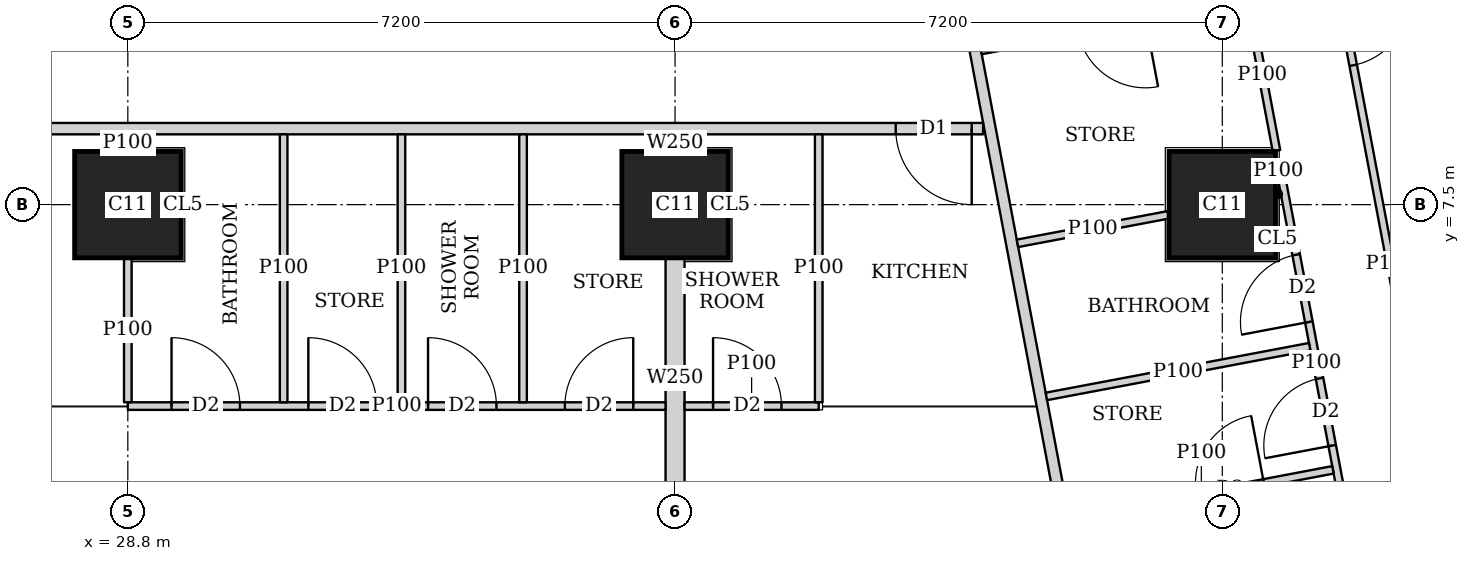
"""IFC4 building model, lengths in metres.
Left out: names, types, materials, properties, quantities, classifications, styles, units other than length and angle.
Written with IfcOpenShell. Run it as: python <this file> out.ifc"""

import sys

from ifc_helpers import new_model, si_unit, direction, frame, frame_2d, origin, origin_2d, place, context, subcontext, project, spatial, rectangle, extrude, element, fill, save


model = new_model("IFC4")
c1 = context("Model", 3, precision=1e-05, world=origin(), true_north=direction((0.0, 1.0)))
c2 = subcontext(c1, "Body", "Model", "MODEL_VIEW")
j1 = project(units=[si_unit("LENGTHUNIT", "METRE"), si_unit("PLANEANGLEUNIT", "RADIAN")], contexts=[c1])
p1 = place(None, origin())
s1 = spatial("IfcSite", under=j1, at=p1, CompositionType="ELEMENT")
p2 = place(p1, origin())
s2 = spatial("IfcBuilding", under=s1, at=p2, CompositionType="ELEMENT")
p3 = place(p2, frame((0.0, 0.0, 212.45)))
s3 = spatial("IfcBuildingStorey", under=s2, at=p3, CompositionType="ELEMENT", Elevation=212.45)
for number, where, z_axis, x_axis in (
    (1, (28.8, 7.5, 0.0), (0.0, 0.0, 1.0), (1.0, 0.0, 0.0)),
    (2, (36.0, 7.5, 0.0), (0.0, 0.0, 1.0), (1.0, 0.0, 0.0)),
    (3, (43.2, 7.5, 0.0), (0.0, 0.0, 1.0), (1.0, 0.0, 0.0)),
):
    element("IfcColumn", number, at=place(p3, frame(where, z_axis=z_axis, x_axis=x_axis)), inside=s3, PredefinedType="COLUMN", context=c2, shape_type="SweptSolid", body=[
        extrude(rectangle(XDim=1.4, YDim=1.4, at=origin_2d()), origin(), (0.0, 0.0, 1.0), 3.75),
    ])
p4 = place(p3, frame((50.653, 2.703, 0.0), z_axis=(0.0, 0.0, 1.0), x_axis=(-0.185612026696, 0.982623109613, 0.0)))
e4 = element("IfcWall", 4, at=p4, inside=s3, PredefinedType="SOLIDWALL", context=c2, shape_type="SweptSolid", body=[
    extrude(rectangle(XDim=41.393, YDim=0.2, at=frame_2d((20.697, 0.0))), origin(), (0.0, 0.0, 1.0), 3.5),
])
p5 = place(p4, frame((1.633, 0.0, 0.9)))
e5 = element("IfcOpeningElement", 5, at=p5, cuts=e4, PredefinedType="OPENING", context=c2, shape_type="SweptSolid", body=[
    extrude(rectangle(XDim=1.8, YDim=1.5, at=frame_2d((0.9, 0.75))), frame((0.0, 0.11, 0.0), z_axis=(0.0, -1.0, 0.0), x_axis=(1.0, 0.0, 0.0)), (0.0, 0.0, 1.0), 0.22),
])
p6 = place(p4, frame((6.032, 0.0, 0.9)))
e6 = element("IfcOpeningElement", 6, at=p6, cuts=e4, PredefinedType="OPENING", context=c2, shape_type="SweptSolid", body=[
    extrude(rectangle(XDim=1.8, YDim=1.5, at=frame_2d((0.9, 0.75))), frame((0.0, 0.11, 0.0), z_axis=(0.0, -1.0, 0.0), x_axis=(1.0, 0.0, 0.0)), (0.0, 0.0, 1.0), 0.22),
])
p7 = place(p4, frame((9.848, 0.0, 0.9)))
e7 = element("IfcOpeningElement", 7, at=p7, cuts=e4, PredefinedType="OPENING", context=c2, shape_type="SweptSolid", body=[
    extrude(rectangle(XDim=1.8, YDim=1.5, at=frame_2d((0.9, 0.75))), frame((0.0, 0.11, 0.0), z_axis=(0.0, -1.0, 0.0), x_axis=(1.0, 0.0, 0.0)), (0.0, 0.0, 1.0), 0.22),
])
p8 = place(p4, frame((13.664, 0.0, 0.9)))
e8 = element("IfcOpeningElement", 8, at=p8, cuts=e4, PredefinedType="OPENING", context=c2, shape_type="SweptSolid", body=[
    extrude(rectangle(XDim=1.8, YDim=1.5, at=frame_2d((0.9, 0.75))), frame((0.0, 0.11, 0.0), z_axis=(0.0, -1.0, 0.0), x_axis=(1.0, 0.0, 0.0)), (0.0, 0.0, 1.0), 0.22),
])
p9 = place(p4, frame((17.481, 0.0, 0.9)))
e9 = element("IfcOpeningElement", 9, at=p9, cuts=e4, PredefinedType="OPENING", context=c2, shape_type="SweptSolid", body=[
    extrude(rectangle(XDim=1.8, YDim=1.5, at=frame_2d((0.9, 0.75))), frame((0.0, 0.11, 0.0), z_axis=(0.0, -1.0, 0.0), x_axis=(1.0, 0.0, 0.0)), (0.0, 0.0, 1.0), 0.22),
])
p10 = place(p4, frame((21.297, 0.0, 0.9)))
e10 = element("IfcOpeningElement", 10, at=p10, cuts=e4, PredefinedType="OPENING", context=c2, shape_type="SweptSolid", body=[
    extrude(rectangle(XDim=1.8, YDim=1.5, at=frame_2d((0.9, 0.75))), frame((0.0, 0.11, 0.0), z_axis=(0.0, -1.0, 0.0), x_axis=(1.0, 0.0, 0.0)), (0.0, 0.0, 1.0), 0.22),
])
p11 = place(p4, frame((25.113, 0.0, 0.9)))
e11 = element("IfcOpeningElement", 11, at=p11, cuts=e4, PredefinedType="OPENING", context=c2, shape_type="SweptSolid", body=[
    extrude(rectangle(XDim=1.8, YDim=1.5, at=frame_2d((0.9, 0.75))), frame((0.0, 0.11, 0.0), z_axis=(0.0, -1.0, 0.0), x_axis=(1.0, 0.0, 0.0)), (0.0, 0.0, 1.0), 0.22),
])
p12 = place(p4, frame((28.93, 0.0, 0.9)))
e12 = element("IfcOpeningElement", 12, at=p12, cuts=e4, PredefinedType="OPENING", context=c2, shape_type="SweptSolid", body=[
    extrude(rectangle(XDim=1.8, YDim=1.5, at=frame_2d((0.9, 0.75))), frame((0.0, 0.11, 0.0), z_axis=(0.0, -1.0, 0.0), x_axis=(1.0, 0.0, 0.0)), (0.0, 0.0, 1.0), 0.22),
])
p13 = place(p4, frame((32.746, 0.0, 0.9)))
e13 = element("IfcOpeningElement", 13, at=p13, cuts=e4, PredefinedType="OPENING", context=c2, shape_type="SweptSolid", body=[
    extrude(rectangle(XDim=1.8, YDim=1.5, at=frame_2d((0.9, 0.75))), frame((0.0, 0.11, 0.0), z_axis=(0.0, -1.0, 0.0), x_axis=(1.0, 0.0, 0.0)), (0.0, 0.0, 1.0), 0.22),
])
p14 = place(p4, frame((36.481, 0.0, 0.9)))
e14 = element("IfcOpeningElement", 14, at=p14, cuts=e4, PredefinedType="OPENING", context=c2, shape_type="SweptSolid", body=[
    extrude(rectangle(XDim=1.8, YDim=1.5, at=frame_2d((0.9, 0.75))), frame((0.0, 0.11, 0.0), z_axis=(0.0, -1.0, 0.0), x_axis=(1.0, 0.0, 0.0)), (0.0, 0.0, 1.0), 0.22),
])
p15 = place(p3, frame((40.053, 8.5, 0.0), z_axis=(0.0, 0.0, 1.0), x_axis=(-1.0, 0.0, 0.0)))
e15 = element("IfcWall", 15, at=p15, inside=s3, PredefinedType="SOLIDWALL", context=c2, shape_type="SweptSolid", body=[
    extrude(rectangle(XDim=31.052, YDim=0.15, at=frame_2d((15.526, 0.0))), origin(), (0.0, 0.0, 1.0), 3.5),
])
p16 = place(p15, frame((29.178, 0.0, 0.0)))
e16 = element("IfcOpeningElement", 16, at=p16, cuts=e15, PredefinedType="OPENING", context=c2, shape_type="SweptSolid", body=[
    extrude(rectangle(XDim=1.0, YDim=2.1, at=frame_2d((0.5, 1.05))), frame((0.0, 0.085, 0.0), z_axis=(0.0, -1.0, 0.0), x_axis=(1.0, 0.0, 0.0)), (0.0, 0.0, 1.0), 0.17),
])
p17 = place(p15, frame((19.953, 0.0, 0.0)))
e17 = element("IfcOpeningElement", 17, at=p17, cuts=e15, PredefinedType="OPENING", context=c2, shape_type="SweptSolid", body=[
    extrude(rectangle(XDim=1.0, YDim=2.1, at=frame_2d((0.5, 1.05))), frame((0.0, 0.085, 0.0), z_axis=(0.0, -1.0, 0.0), x_axis=(1.0, 0.0, 0.0)), (0.0, 0.0, 1.0), 0.17),
])
p18 = place(p15, frame((12.753, 0.0, 0.0)))
e18 = element("IfcOpeningElement", 18, at=p18, cuts=e15, PredefinedType="OPENING", context=c2, shape_type="SweptSolid", body=[
    extrude(rectangle(XDim=1.0, YDim=2.1, at=frame_2d((0.5, 1.05))), frame((0.0, 0.085, 0.0), z_axis=(0.0, -1.0, 0.0), x_axis=(1.0, 0.0, 0.0)), (0.0, 0.0, 1.0), 0.17),
])
p19 = place(p15, frame((0.15, 0.0, 0.0)))
e19 = element("IfcOpeningElement", 19, at=p19, cuts=e15, PredefinedType="OPENING", context=c2, shape_type="SweptSolid", body=[
    extrude(rectangle(XDim=1.0, YDim=2.1, at=frame_2d((0.5, 1.05))), frame((0.0, 0.085, 0.0), z_axis=(0.0, -1.0, 0.0), x_axis=(1.0, 0.0, 0.0)), (0.0, 0.0, 1.0), 0.17),
])
p20 = place(p3, frame((33.68, 42.723, 0.0), z_axis=(0.0, 0.0, 1.0), x_axis=(0.185601160014, -0.982625162207, 0.0)))
e20 = element("IfcWall", 20, at=p20, inside=s3, PredefinedType="SOLIDWALL", context=c2, shape_type="SweptSolid", body=[
    extrude(rectangle(XDim=41.051, YDim=0.15, at=frame_2d((20.526, 0.0))), origin(), (0.0, 0.0, 1.0), 2.5),
])
p21 = place(p20, frame((12.307, 0.0, 0.0)))
e21 = element("IfcOpeningElement", 21, at=p21, cuts=e20, PredefinedType="OPENING", context=c2, shape_type="SweptSolid", body=[
    extrude(rectangle(XDim=1.0, YDim=2.1, at=frame_2d((0.5, 1.05))), frame((0.0, 0.085, 0.0), z_axis=(0.0, -1.0, 0.0), x_axis=(1.0, 0.0, 0.0)), (0.0, 0.0, 1.0), 0.17),
])
p22 = place(p20, frame((16.123, 0.0, 0.0)))
e22 = element("IfcOpeningElement", 22, at=p22, cuts=e20, PredefinedType="OPENING", context=c2, shape_type="SweptSolid", body=[
    extrude(rectangle(XDim=1.0, YDim=2.1, at=frame_2d((0.5, 1.05))), frame((0.0, 0.085, 0.0), z_axis=(0.0, -1.0, 0.0), x_axis=(1.0, 0.0, 0.0)), (0.0, 0.0, 1.0), 0.17),
])
p23 = place(p20, frame((30.902, 0.0, 0.0)))
e23 = element("IfcOpeningElement", 23, at=p23, cuts=e20, PredefinedType="OPENING", context=c2, shape_type="SweptSolid", body=[
    extrude(rectangle(XDim=1.0, YDim=2.1, at=frame_2d((0.5, 1.05))), frame((0.0, 0.085, 0.0), z_axis=(0.0, -1.0, 0.0), x_axis=(1.0, 0.0, 0.0)), (0.0, 0.0, 1.0), 0.17),
])
p24 = place(p3, frame((35.875, 4.85, 0.0), z_axis=(0.0, 0.0, 1.0), x_axis=(-1.0, 0.0, 0.0)))
e24 = element("IfcWall", 24, at=p24, inside=s3, PredefinedType="PARTITIONING", context=c2, shape_type="SweptSolid", body=[
    extrude(rectangle(XDim=7.075, YDim=0.1, at=frame_2d((3.538, 0.0))), origin(), (0.0, 0.0, 1.0), 3.5),
])
p25 = place(p24, frame((5.6, 0.0, 0.0)))
e25 = element("IfcOpeningElement", 25, at=p25, cuts=e24, PredefinedType="OPENING", context=c2, shape_type="SweptSolid", body=[
    extrude(rectangle(XDim=0.9, YDim=2.1, at=frame_2d((0.45, 1.05))), frame((0.0, 0.06, 0.0), z_axis=(0.0, -1.0, 0.0), x_axis=(1.0, 0.0, 0.0)), (0.0, 0.0, 1.0), 0.12),
])
p26 = place(p24, frame((2.225, 0.0, 0.0)))
e26 = element("IfcOpeningElement", 26, at=p26, cuts=e24, PredefinedType="OPENING", context=c2, shape_type="SweptSolid", body=[
    extrude(rectangle(XDim=0.9, YDim=2.1, at=frame_2d((0.45, 1.05))), frame((0.0, 0.06, 0.0), z_axis=(0.0, -1.0, 0.0), x_axis=(1.0, 0.0, 0.0)), (0.0, 0.0, 1.0), 0.12),
])
p27 = place(p24, frame((3.8, 0.0, 0.0)))
e27 = element("IfcOpeningElement", 27, at=p27, cuts=e24, PredefinedType="OPENING", context=c2, shape_type="SweptSolid", body=[
    extrude(rectangle(XDim=0.9, YDim=2.1, at=frame_2d((0.45, 1.05))), frame((0.0, 0.06, 0.0), z_axis=(0.0, -1.0, 0.0), x_axis=(1.0, 0.0, 0.0)), (0.0, 0.0, 1.0), 0.12),
])
p28 = place(p24, frame((0.425, 0.0, 0.0)))
e28 = element("IfcOpeningElement", 28, at=p28, cuts=e24, PredefinedType="OPENING", context=c2, shape_type="SweptSolid", body=[
    extrude(rectangle(XDim=0.9, YDim=2.1, at=frame_2d((0.45, 1.05))), frame((0.0, 0.06, 0.0), z_axis=(0.0, -1.0, 0.0), x_axis=(1.0, 0.0, 0.0)), (0.0, 0.0, 1.0), 0.12),
])
p29 = place(p3, frame((28.8, 4.9, 0.0), z_axis=(0.0, 0.0, 1.0), x_axis=(0.0, 1.0, 0.0)))
e29 = element("IfcWall", 29, at=p29, inside=s3, PredefinedType="PARTITIONING", context=c2, shape_type="SweptSolid", body=[
    extrude(rectangle(XDim=1.899, YDim=0.1, at=frame_2d((0.95, 0.0))), origin(), (0.0, 0.0, 1.0), 3.5),
])
p30 = place(p3, frame((28.8, 8.201, 0.0), z_axis=(0.0, 0.0, 1.0), x_axis=(0.0, 1.0, 0.0)))
e30 = element("IfcWall", 30, at=p30, inside=s3, PredefinedType="PARTITIONING", context=c2, shape_type="SweptSolid", body=[
    extrude(rectangle(XDim=0.224, YDim=0.1, at=frame_2d((0.112, 0.0))), origin(), (0.0, 0.0, 1.0), 3.5),
])
for number, where, z_axis, x_axis in (
    (31, (32.4, 4.9, 0.0), (0.0, 0.0, 1.0), (0.0, 1.0, 0.0)),
    (32, (30.85, 4.9, 0.0), (0.0, 0.0, 1.0), (0.0, 1.0, 0.0)),
    (33, (34.0, 4.9, 0.0), (0.0, 0.0, 1.0), (0.0, 1.0, 0.0)),
):
    element("IfcWall", number, at=place(p3, frame(where, z_axis=z_axis, x_axis=x_axis)), inside=s3, PredefinedType="PARTITIONING", context=c2, shape_type="SweptSolid", body=[
        extrude(rectangle(XDim=3.525, YDim=0.1, at=frame_2d((1.763, 0.0))), origin(), (0.0, 0.0, 1.0), 3.5),
    ])
p31 = place(p3, frame((37.89, 4.85, 0.0), z_axis=(0.0, 0.0, 1.0), x_axis=(-1.0, 0.0, 0.0)))
e34 = element("IfcWall", 34, at=p31, inside=s3, PredefinedType="PARTITIONING", context=c2, shape_type="SweptSolid", body=[
    extrude(rectangle(XDim=1.765, YDim=0.1, at=frame_2d((0.882, 0.0))), origin(), (0.0, 0.0, 1.0), 3.5),
])
p32 = place(p31, frame((0.49, 0.0, 0.0)))
e35 = element("IfcOpeningElement", 35, at=p32, cuts=e34, PredefinedType="OPENING", context=c2, shape_type="SweptSolid", body=[
    extrude(rectangle(XDim=0.9, YDim=2.1, at=frame_2d((0.45, 1.05))), frame((0.0, 0.06, 0.0), z_axis=(0.0, -1.0, 0.0), x_axis=(1.0, 0.0, 0.0)), (0.0, 0.0, 1.0), 0.12),
])
p33 = place(p3, frame((37.89, 4.9, 0.0), z_axis=(0.0, 0.0, 1.0), x_axis=(0.0, 1.0, 0.0)))
e36 = element("IfcWall", 36, at=p33, inside=s3, PredefinedType="PARTITIONING", context=c2, shape_type="SweptSolid", body=[
    extrude(rectangle(XDim=3.525, YDim=0.1, at=frame_2d((1.763, 0.0))), origin(), (0.0, 0.0, 1.0), 3.5),
])
p34 = place(p3, frame((36.0, 3.65, 0.0), z_axis=(0.0, 0.0, 1.0), x_axis=(0.0, 1.0, 0.0)))
e37 = element("IfcWall", 37, at=p34, inside=s3, PredefinedType="SOLIDWALL", context=c2, shape_type="SweptSolid", body=[
    extrude(rectangle(XDim=3.149, YDim=0.25, at=frame_2d((1.575, 0.0))), origin(), (0.0, 0.0, 1.0), 3.5),
])
p35 = place(p3, frame((36.0, 8.201, 0.0), z_axis=(0.0, 0.0, 1.0), x_axis=(0.0, 1.0, 0.0)))
e38 = element("IfcWall", 38, at=p35, inside=s3, PredefinedType="SOLIDWALL", context=c2, shape_type="SweptSolid", body=[
    extrude(rectangle(XDim=0.224, YDim=0.25, at=frame_2d((0.112, 0.0))), origin(), (0.0, 0.0, 1.0), 3.5),
])
p36 = place(p3, frame((44.727, 10.366, 0.0), z_axis=(0.0, 0.0, 1.0), x_axis=(0.185678775129, -0.982610498858, 0.0)))
e39 = element("IfcWall", 39, at=p36, inside=s3, PredefinedType="PARTITIONING", context=c2, shape_type="SweptSolid", body=[
    extrude(rectangle(XDim=7.421, YDim=0.1, at=frame_2d((3.71, 0.0))), origin(), (0.0, 0.0, 1.0), 3.5),
])
p37 = place(p36, frame((0.151, 0.0, 0.0)))
e40 = element("IfcOpeningElement", 40, at=p37, cuts=e39, PredefinedType="OPENING", context=c2, shape_type="SweptSolid", body=[
    extrude(rectangle(XDim=0.9, YDim=2.1, at=frame_2d((0.45, 1.05))), frame((0.0, 0.06, 0.0), z_axis=(0.0, -1.0, 0.0), x_axis=(1.0, 0.0, 0.0)), (0.0, 0.0, 1.0), 0.12),
])
p38 = place(p36, frame((4.65, 0.0, 0.0)))
e41 = element("IfcOpeningElement", 41, at=p38, cuts=e39, PredefinedType="OPENING", context=c2, shape_type="SweptSolid", body=[
    extrude(rectangle(XDim=0.9, YDim=2.1, at=frame_2d((0.45, 1.05))), frame((0.0, 0.06, 0.0), z_axis=(0.0, -1.0, 0.0), x_axis=(1.0, 0.0, 0.0)), (0.0, 0.0, 1.0), 0.12),
])
p39 = place(p3, frame((43.539, 10.192, 0.0), z_axis=(0.0, 0.0, 1.0), x_axis=(0.185443145218, -0.982654995353, 0.0)))
e42 = element("IfcWall", 42, at=p39, inside=s3, PredefinedType="PARTITIONING", context=c2, shape_type="SweptSolid", body=[
    extrude(rectangle(XDim=2.017, YDim=0.1, at=frame_2d((1.008, 0.0))), origin(), (0.0, 0.0, 1.0), 3.5),
])
p40 = place(p3, frame((43.949, 8.02, 0.0), z_axis=(0.0, 0.0, 1.0), x_axis=(0.185656792073, -0.982614652627, 0.0)))
e43 = element("IfcWall", 43, at=p40, inside=s3, PredefinedType="PARTITIONING", context=c2, shape_type="SweptSolid", body=[
    extrude(rectangle(XDim=5.289, YDim=0.1, at=frame_2d((2.645, 0.0))), origin(), (0.0, 0.0, 1.0), 3.5),
])
p41 = place(p40, frame((1.2, 0.0, 0.0)))
e44 = element("IfcOpeningElement", 44, at=p41, cuts=e43, PredefinedType="OPENING", context=c2, shape_type="SweptSolid", body=[
    extrude(rectangle(XDim=0.9, YDim=2.1, at=frame_2d((0.45, 1.05))), frame((0.0, 0.06, 0.0), z_axis=(0.0, -1.0, 0.0), x_axis=(1.0, 0.0, 0.0)), (0.0, 0.0, 1.0), 0.12),
])
p42 = place(p40, frame((2.855, 0.0, 0.0)))
e45 = element("IfcOpeningElement", 45, at=p42, cuts=e43, PredefinedType="OPENING", context=c2, shape_type="SweptSolid", body=[
    extrude(rectangle(XDim=0.9, YDim=2.1, at=frame_2d((0.45, 1.05))), frame((0.0, 0.06, 0.0), z_axis=(0.0, -1.0, 0.0), x_axis=(1.0, 0.0, 0.0)), (0.0, 0.0, 1.0), 0.12),
])
p43 = place(p3, frame((43.49, 10.183, 0.0), z_axis=(0.0, 0.0, 1.0), x_axis=(-0.982588017646, -0.185797706064, 0.0)))
e46 = element("IfcWall", 46, at=p43, inside=s3, PredefinedType="PARTITIONING", context=c2, shape_type="SweptSolid", body=[
    extrude(rectangle(XDim=3.525, YDim=0.1, at=frame_2d((1.763, 0.0))), origin(), (0.0, 0.0, 1.0), 3.5),
])
p44 = place(p43, frame((1.325, 0.0, 0.0)))
e47 = element("IfcOpeningElement", 47, at=p44, cuts=e46, PredefinedType="OPENING", context=c2, shape_type="SweptSolid", body=[
    extrude(rectangle(XDim=0.9, YDim=2.1, at=frame_2d((0.45, 1.05))), frame((0.0, 0.06, 0.0), z_axis=(0.0, -1.0, 0.0), x_axis=(1.0, 0.0, 0.0)), (0.0, 0.0, 1.0), 0.12),
])
p45 = place(p3, frame((43.969, 7.646, 0.0), z_axis=(0.0, 0.0, 1.0), x_axis=(-0.983147034646, -0.182816597351, 0.0)))
e48 = element("IfcWall", 48, at=p45, inside=s3, PredefinedType="PARTITIONING", context=c2, shape_type="SweptSolid", body=[
    extrude(rectangle(XDim=0.06, YDim=0.1, at=frame_2d((0.03, 0.0))), origin(), (0.0, 0.0, 1.0), 3.5),
])
p46 = place(p3, frame((42.49, 7.366, 0.0), z_axis=(0.0, 0.0, 1.0), x_axis=(-0.982620917875, -0.185623629302, 0.0)))
e49 = element("IfcWall", 49, at=p46, inside=s3, PredefinedType="PARTITIONING", context=c2, shape_type="SweptSolid", body=[
    extrude(rectangle(XDim=2.02, YDim=0.1, at=frame_2d((1.01, 0.0))), origin(), (0.0, 0.0, 1.0), 3.5),
])
p47 = place(p3, frame((44.35, 5.631, 0.0), z_axis=(0.0, 0.0, 1.0), x_axis=(-0.982638553676, -0.185530247748, 0.0)))
e50 = element("IfcWall", 50, at=p47, inside=s3, PredefinedType="PARTITIONING", context=c2, shape_type="SweptSolid", body=[
    extrude(rectangle(XDim=3.525, YDim=0.1, at=frame_2d((1.763, 0.0))), origin(), (0.0, 0.0, 1.0), 3.5),
])
p48 = place(p3, frame((41.192, 3.356, 0.0), z_axis=(0.0, 0.0, 1.0), x_axis=(0.982588017646, 0.185797706064, 0.0)))
e51 = element("IfcWall", 51, at=p48, inside=s3, PredefinedType="PARTITIONING", context=c2, shape_type="SweptSolid", body=[
    extrude(rectangle(XDim=3.525, YDim=0.1, at=frame_2d((1.763, 0.0))), origin(), (0.0, 0.0, 1.0), 3.5),
])
p49 = place(p48, frame((1.7, 0.0, 0.0)))
e52 = element("IfcOpeningElement", 52, at=p49, cuts=e51, PredefinedType="OPENING", context=c2, shape_type="SweptSolid", body=[
    extrude(rectangle(XDim=0.9, YDim=2.1, at=frame_2d((0.45, 1.05))), frame((0.0, 0.06, 0.0), z_axis=(0.0, -1.0, 0.0), x_axis=(1.0, 0.0, 0.0)), (0.0, 0.0, 1.0), 0.12),
])
p50 = place(p25, origin())
e53 = element("IfcDoor", 53, at=p50, inside=s3, OperationType="SINGLE_SWING_LEFT", PredefinedType="DOOR", context=c2, shape_type="SweptSolid", body=[
    extrude(rectangle(XDim=0.9, YDim=2.1, at=frame_2d((0.45, 1.05))), frame((0.0, 0.025, 0.0), z_axis=(0.0, -1.0, 0.0), x_axis=(1.0, 0.0, 0.0)), (0.0, 0.0, 1.0), 0.05),
])
fill(e25, e53)
p51 = place(p26, origin())
e54 = element("IfcDoor", 54, at=p51, inside=s3, OperationType="SINGLE_SWING_LEFT", PredefinedType="DOOR", context=c2, shape_type="SweptSolid", body=[
    extrude(rectangle(XDim=0.9, YDim=2.1, at=frame_2d((0.45, 1.05))), frame((0.0, 0.025, 0.0), z_axis=(0.0, -1.0, 0.0), x_axis=(1.0, 0.0, 0.0)), (0.0, 0.0, 1.0), 0.05),
])
fill(e26, e54)
p52 = place(p27, origin())
e55 = element("IfcDoor", 55, at=p52, inside=s3, OperationType="SINGLE_SWING_LEFT", PredefinedType="DOOR", context=c2, shape_type="SweptSolid", body=[
    extrude(rectangle(XDim=0.9, YDim=2.1, at=frame_2d((0.45, 1.05))), frame((0.0, 0.025, 0.0), z_axis=(0.0, -1.0, 0.0), x_axis=(1.0, 0.0, 0.0)), (0.0, 0.0, 1.0), 0.05),
])
fill(e27, e55)
p53 = place(p28, origin())
e56 = element("IfcDoor", 56, at=p53, inside=s3, OperationType="SINGLE_SWING_RIGHT", PredefinedType="DOOR", context=c2, shape_type="SweptSolid", body=[
    extrude(rectangle(XDim=0.9, YDim=2.1, at=frame_2d((0.45, 1.05))), frame((0.0, 0.025, 0.0), z_axis=(0.0, -1.0, 0.0), x_axis=(1.0, 0.0, 0.0)), (0.0, 0.0, 1.0), 0.05),
])
fill(e28, e56)
p54 = place(p32, origin())
e57 = element("IfcDoor", 57, at=p54, inside=s3, OperationType="SINGLE_SWING_LEFT", PredefinedType="DOOR", context=c2, shape_type="SweptSolid", body=[
    extrude(rectangle(XDim=0.9, YDim=2.1, at=frame_2d((0.45, 1.05))), frame((0.0, 0.025, 0.0), z_axis=(0.0, -1.0, 0.0), x_axis=(1.0, 0.0, 0.0)), (0.0, 0.0, 1.0), 0.05),
])
fill(e35, e57)
p55 = place(p19, origin())
e58 = element("IfcDoor", 58, at=p55, inside=s3, OperationType="SINGLE_SWING_LEFT", PredefinedType="DOOR", context=c2, shape_type="SweptSolid", body=[
    extrude(rectangle(XDim=1.0, YDim=2.1, at=frame_2d((0.5, 1.05))), frame((0.0, 0.025, 0.0), z_axis=(0.0, -1.0, 0.0), x_axis=(1.0, 0.0, 0.0)), (0.0, 0.0, 1.0), 0.05),
])
fill(e19, e58)
p56 = place(p37, origin())
e59 = element("IfcDoor", 59, at=p56, inside=s3, OperationType="SINGLE_SWING_LEFT", PredefinedType="DOOR", context=c2, shape_type="SweptSolid", body=[
    extrude(rectangle(XDim=0.9, YDim=2.1, at=frame_2d((0.45, 1.05))), frame((0.0, 0.025, 0.0), z_axis=(0.0, -1.0, 0.0), x_axis=(1.0, 0.0, 0.0)), (0.0, 0.0, 1.0), 0.05),
])
fill(e40, e59)
p57 = place(p41, origin())
e60 = element("IfcDoor", 60, at=p57, inside=s3, OperationType="SINGLE_SWING_LEFT", PredefinedType="DOOR", context=c2, shape_type="SweptSolid", body=[
    extrude(rectangle(XDim=0.9, YDim=2.1, at=frame_2d((0.45, 1.05))), frame((0.0, 0.025, 0.0), z_axis=(0.0, -1.0, 0.0), x_axis=(1.0, 0.0, 0.0)), (0.0, 0.0, 1.0), 0.05),
])
fill(e44, e60)
p58 = place(p42, origin())
e61 = element("IfcDoor", 61, at=p58, inside=s3, OperationType="SINGLE_SWING_LEFT", PredefinedType="DOOR", context=c2, shape_type="SweptSolid", body=[
    extrude(rectangle(XDim=0.9, YDim=2.1, at=frame_2d((0.45, 1.05))), frame((0.0, 0.025, 0.0), z_axis=(0.0, -1.0, 0.0), x_axis=(1.0, 0.0, 0.0)), (0.0, 0.0, 1.0), 0.05),
])
fill(e45, e61)
p59 = place(p49, origin())
e62 = element("IfcDoor", 62, at=p59, inside=s3, OperationType="SINGLE_SWING_RIGHT", PredefinedType="DOOR", context=c2, shape_type="SweptSolid", body=[
    extrude(rectangle(XDim=0.9, YDim=2.1, at=frame_2d((0.45, 1.05))), frame((0.0, 0.025, 0.0), z_axis=(0.0, -1.0, 0.0), x_axis=(1.0, 0.0, 0.0)), (0.0, 0.0, 1.0), 0.05),
])
fill(e52, e62)
save(model, sys.argv[1])
